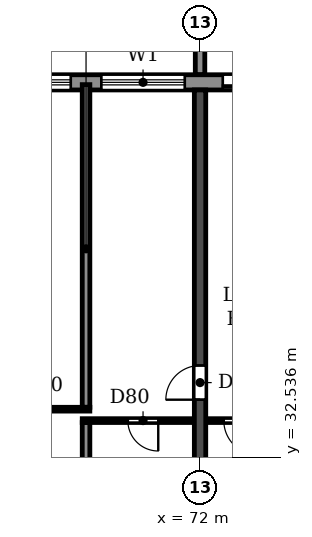
"""IFC4 building model, lengths in metres.
Left out: names, types, materials, properties, quantities, classifications, styles, units other than length and angle.
Written with IfcOpenShell. Run it as: python <this file> out.ifc"""

import sys

from ifc_helpers import new_model, si_unit, direction, frame, frame_2d, origin, place, context, subcontext, project, spatial, polyline, rectangle, outline, extrude, source, transform, mapped, element, fill, save


model = new_model("IFC4")
c1 = context("Model", 3, precision=1e-05, world=origin(), true_north=direction((0.0, 1.0)))
c2 = subcontext(c1, "Body", "Model", "MODEL_VIEW")
j1 = project(units=[si_unit("LENGTHUNIT", "METRE"), si_unit("PLANEANGLEUNIT", "RADIAN")], contexts=[c1])
p1 = place(None, origin())
s1 = spatial("IfcSite", under=j1, at=p1, CompositionType="ELEMENT")
p2 = place(p1, origin())
s2 = spatial("IfcBuilding", under=s1, at=p2, CompositionType="ELEMENT")
p3 = place(p2, frame((0.0, 0.0, 155.4)))
s3 = spatial("IfcBuildingStorey", under=s2, at=p3, CompositionType="ELEMENT", Elevation=155.4)
p4 = place(p3, frame((72.0, 30.525, 0.0), z_axis=(0.0, 0.0, 1.0), x_axis=(0.0, 1.0, 0.0)))
e1 = element("IfcWall", 1, at=p4, inside=s3, PredefinedType="SHEAR", context=c2, shape_type="SweptSolid", body=[
    extrude(rectangle(XDim=11.675, YDim=0.3, at=frame_2d((5.837, 0.0))), origin(), (0.0, 0.0, 1.0), 3.0),
])
p5 = place(p4, frame((3.525, 0.0, 0.0)))
e2 = element("IfcOpeningElement", 2, at=p5, cuts=e1, PredefinedType="OPENING", context=c2, shape_type="SweptSolid", body=[
    extrude(rectangle(XDim=0.9, YDim=2.1, at=frame_2d((0.45, 1.05))), frame((0.0, 0.16, 0.0), z_axis=(0.0, -1.0, 0.0), x_axis=(1.0, 0.0, 0.0)), (0.0, 0.0, 1.0), 0.32),
])
p6 = place(p3, frame((85.317, 42.4, 0.0), z_axis=(0.0, 0.0, 1.0), x_axis=(-1.0, 0.0, 0.0)))
e3 = element("IfcWall", 3, at=p6, inside=s3, PredefinedType="STANDARD", context=c2, shape_type="SweptSolid", body=[
    extrude(rectangle(XDim=68.634, YDim=0.4, at=frame_2d((34.317, 0.0))), origin(), (0.0, 0.0, 1.0), 3.0),
])
p7 = place(p6, frame((64.917, 0.0, 0.0)))
e4 = element("IfcOpeningElement", 4, at=p7, cuts=e3, PredefinedType="OPENING", context=c2, shape_type="SweptSolid", body=[
    extrude(rectangle(XDim=1.8, YDim=2.4, at=frame_2d((0.9, 1.2))), frame((0.0, 0.21, 0.0), z_axis=(0.0, -1.0, 0.0), x_axis=(1.0, 0.0, 0.0)), (0.0, 0.0, 1.0), 0.42),
])
p8 = place(p6, frame((61.717, 0.0, 0.9)))
e5 = element("IfcOpeningElement", 5, at=p8, cuts=e3, PredefinedType="OPENING", context=c2, shape_type="SweptSolid", body=[
    extrude(rectangle(XDim=2.2, YDim=1.5, at=frame_2d((1.1, 0.75))), frame((0.0, 0.21, 0.0), z_axis=(0.0, -1.0, 0.0), x_axis=(1.0, 0.0, 0.0)), (0.0, 0.0, 1.0), 0.42),
])
p9 = place(p6, frame((58.717, 0.0, 0.9)))
e6 = element("IfcOpeningElement", 6, at=p9, cuts=e3, PredefinedType="OPENING", context=c2, shape_type="SweptSolid", body=[
    extrude(rectangle(XDim=2.2, YDim=1.5, at=frame_2d((1.1, 0.75))), frame((0.0, 0.21, 0.0), z_axis=(0.0, -1.0, 0.0), x_axis=(1.0, 0.0, 0.0)), (0.0, 0.0, 1.0), 0.42),
])
p10 = place(p6, frame((55.917, 0.0, 0.0)))
e7 = element("IfcOpeningElement", 7, at=p10, cuts=e3, PredefinedType="OPENING", context=c2, shape_type="SweptSolid", body=[
    extrude(rectangle(XDim=1.8, YDim=2.4, at=frame_2d((0.9, 1.2))), frame((0.0, 0.21, 0.0), z_axis=(0.0, -1.0, 0.0), x_axis=(1.0, 0.0, 0.0)), (0.0, 0.0, 1.0), 0.42),
])
p11 = place(p6, frame((52.917, 0.0, 0.0)))
e8 = element("IfcOpeningElement", 8, at=p11, cuts=e3, PredefinedType="OPENING", context=c2, shape_type="SweptSolid", body=[
    extrude(rectangle(XDim=1.8, YDim=2.4, at=frame_2d((0.9, 1.2))), frame((0.0, 0.21, 0.0), z_axis=(0.0, -1.0, 0.0), x_axis=(1.0, 0.0, 0.0)), (0.0, 0.0, 1.0), 0.42),
])
p12 = place(p6, frame((49.717, 0.0, 0.9)))
e9 = element("IfcOpeningElement", 9, at=p12, cuts=e3, PredefinedType="OPENING", context=c2, shape_type="SweptSolid", body=[
    extrude(rectangle(XDim=2.2, YDim=1.5, at=frame_2d((1.1, 0.75))), frame((0.0, 0.21, 0.0), z_axis=(0.0, -1.0, 0.0), x_axis=(1.0, 0.0, 0.0)), (0.0, 0.0, 1.0), 0.42),
])
p13 = place(p6, frame((46.717, 0.0, 0.9)))
e10 = element("IfcOpeningElement", 10, at=p13, cuts=e3, PredefinedType="OPENING", context=c2, shape_type="SweptSolid", body=[
    extrude(rectangle(XDim=2.2, YDim=1.5, at=frame_2d((1.1, 0.75))), frame((0.0, 0.21, 0.0), z_axis=(0.0, -1.0, 0.0), x_axis=(1.0, 0.0, 0.0)), (0.0, 0.0, 1.0), 0.42),
])
p14 = place(p6, frame((43.717, 0.0, 0.9)))
e11 = element("IfcOpeningElement", 11, at=p14, cuts=e3, PredefinedType="OPENING", context=c2, shape_type="SweptSolid", body=[
    extrude(rectangle(XDim=2.2, YDim=1.5, at=frame_2d((1.1, 0.75))), frame((0.0, 0.21, 0.0), z_axis=(0.0, -1.0, 0.0), x_axis=(1.0, 0.0, 0.0)), (0.0, 0.0, 1.0), 0.42),
])
p15 = place(p6, frame((40.917, 0.0, 0.0)))
e12 = element("IfcOpeningElement", 12, at=p15, cuts=e3, PredefinedType="OPENING", context=c2, shape_type="SweptSolid", body=[
    extrude(rectangle(XDim=1.8, YDim=2.4, at=frame_2d((0.9, 1.2))), frame((0.0, 0.21, 0.0), z_axis=(0.0, -1.0, 0.0), x_axis=(1.0, 0.0, 0.0)), (0.0, 0.0, 1.0), 0.42),
])
p16 = place(p6, frame((37.717, 0.0, 0.9)))
e13 = element("IfcOpeningElement", 13, at=p16, cuts=e3, PredefinedType="OPENING", context=c2, shape_type="SweptSolid", body=[
    extrude(rectangle(XDim=2.2, YDim=1.5, at=frame_2d((1.1, 0.75))), frame((0.0, 0.21, 0.0), z_axis=(0.0, -1.0, 0.0), x_axis=(1.0, 0.0, 0.0)), (0.0, 0.0, 1.0), 0.42),
])
p17 = place(p6, frame((34.917, 0.0, 0.0)))
e14 = element("IfcOpeningElement", 14, at=p17, cuts=e3, PredefinedType="OPENING", context=c2, shape_type="SweptSolid", body=[
    extrude(rectangle(XDim=1.8, YDim=2.4, at=frame_2d((0.9, 1.2))), frame((0.0, 0.21, 0.0), z_axis=(0.0, -1.0, 0.0), x_axis=(1.0, 0.0, 0.0)), (0.0, 0.0, 1.0), 0.42),
])
p18 = place(p6, frame((31.717, 0.0, 0.9)))
e15 = element("IfcOpeningElement", 15, at=p18, cuts=e3, PredefinedType="OPENING", context=c2, shape_type="SweptSolid", body=[
    extrude(rectangle(XDim=2.2, YDim=1.5, at=frame_2d((1.1, 0.75))), frame((0.0, 0.21, 0.0), z_axis=(0.0, -1.0, 0.0), x_axis=(1.0, 0.0, 0.0)), (0.0, 0.0, 1.0), 0.42),
])
p19 = place(p6, frame((28.717, 0.0, 0.9)))
e16 = element("IfcOpeningElement", 16, at=p19, cuts=e3, PredefinedType="OPENING", context=c2, shape_type="SweptSolid", body=[
    extrude(rectangle(XDim=2.2, YDim=1.5, at=frame_2d((1.1, 0.75))), frame((0.0, 0.21, 0.0), z_axis=(0.0, -1.0, 0.0), x_axis=(1.0, 0.0, 0.0)), (0.0, 0.0, 1.0), 0.42),
])
p20 = place(p6, frame((25.717, 0.0, 0.9)))
e17 = element("IfcOpeningElement", 17, at=p20, cuts=e3, PredefinedType="OPENING", context=c2, shape_type="SweptSolid", body=[
    extrude(rectangle(XDim=2.2, YDim=1.5, at=frame_2d((1.1, 0.75))), frame((0.0, 0.21, 0.0), z_axis=(0.0, -1.0, 0.0), x_axis=(1.0, 0.0, 0.0)), (0.0, 0.0, 1.0), 0.42),
])
p21 = place(p6, frame((22.717, 0.0, 0.9)))
e18 = element("IfcOpeningElement", 18, at=p21, cuts=e3, PredefinedType="OPENING", context=c2, shape_type="SweptSolid", body=[
    extrude(rectangle(XDim=2.2, YDim=1.5, at=frame_2d((1.1, 0.75))), frame((0.0, 0.21, 0.0), z_axis=(0.0, -1.0, 0.0), x_axis=(1.0, 0.0, 0.0)), (0.0, 0.0, 1.0), 0.42),
])
p22 = place(p6, frame((19.917, 0.0, 0.0)))
e19 = element("IfcOpeningElement", 19, at=p22, cuts=e3, PredefinedType="OPENING", context=c2, shape_type="SweptSolid", body=[
    extrude(rectangle(XDim=1.8, YDim=2.4, at=frame_2d((0.9, 1.2))), frame((0.0, 0.21, 0.0), z_axis=(0.0, -1.0, 0.0), x_axis=(1.0, 0.0, 0.0)), (0.0, 0.0, 1.0), 0.42),
])
p23 = place(p6, frame((16.717, 0.0, 0.9)))
e20 = element("IfcOpeningElement", 20, at=p23, cuts=e3, PredefinedType="OPENING", context=c2, shape_type="SweptSolid", body=[
    extrude(rectangle(XDim=2.2, YDim=1.5, at=frame_2d((1.1, 0.75))), frame((0.0, 0.21, 0.0), z_axis=(0.0, -1.0, 0.0), x_axis=(1.0, 0.0, 0.0)), (0.0, 0.0, 1.0), 0.42),
])
p24 = place(p6, frame((13.717, 0.0, 0.9)))
e21 = element("IfcOpeningElement", 21, at=p24, cuts=e3, PredefinedType="OPENING", context=c2, shape_type="SweptSolid", body=[
    extrude(rectangle(XDim=2.2, YDim=1.5, at=frame_2d((1.1, 0.75))), frame((0.0, 0.21, 0.0), z_axis=(0.0, -1.0, 0.0), x_axis=(1.0, 0.0, 0.0)), (0.0, 0.0, 1.0), 0.42),
])
p25 = place(p6, frame((10.917, 0.0, 0.0)))
e22 = element("IfcOpeningElement", 22, at=p25, cuts=e3, PredefinedType="OPENING", context=c2, shape_type="SweptSolid", body=[
    extrude(rectangle(XDim=1.8, YDim=2.4, at=frame_2d((0.9, 1.2))), frame((0.0, 0.21, 0.0), z_axis=(0.0, -1.0, 0.0), x_axis=(1.0, 0.0, 0.0)), (0.0, 0.0, 1.0), 0.42),
])
p26 = place(p6, frame((7.717, 0.0, 0.9)))
e23 = element("IfcOpeningElement", 23, at=p26, cuts=e3, PredefinedType="OPENING", context=c2, shape_type="SweptSolid", body=[
    extrude(rectangle(XDim=2.2, YDim=1.5, at=frame_2d((1.1, 0.75))), frame((0.0, 0.21, 0.0), z_axis=(0.0, -1.0, 0.0), x_axis=(1.0, 0.0, 0.0)), (0.0, 0.0, 1.0), 0.42),
])
p27 = place(p6, frame((4.717, 0.0, 0.9)))
e24 = element("IfcOpeningElement", 24, at=p27, cuts=e3, PredefinedType="OPENING", context=c2, shape_type="SweptSolid", body=[
    extrude(rectangle(XDim=2.2, YDim=1.5, at=frame_2d((1.1, 0.75))), frame((0.0, 0.21, 0.0), z_axis=(0.0, -1.0, 0.0), x_axis=(1.0, 0.0, 0.0)), (0.0, 0.0, 1.0), 0.42),
])
p28 = place(p6, frame((1.917, 0.0, 0.0)))
e25 = element("IfcOpeningElement", 25, at=p28, cuts=e3, PredefinedType="OPENING", context=c2, shape_type="SweptSolid", body=[
    extrude(rectangle(XDim=1.8, YDim=2.4, at=frame_2d((0.9, 1.2))), frame((0.0, 0.21, 0.0), z_axis=(0.0, -1.0, 0.0), x_axis=(1.0, 0.0, 0.0)), (0.0, 0.0, 1.0), 0.42),
])
m1 = source(origin(), c2, "Body", "SweptSolid", [
    extrude(outline(polyline([(0.0, 0.0), (0.25, 0.0), (0.25, 3.1), (0.0, 3.1), (0.0, 0.0)])), origin(), (0.0, 0.0, 1.0), 3.1),
])
p29 = place(p3, frame((71.875, 42.6, 0.0)))
e26 = element("IfcWall", 26, at=p29, inside=s3, PredefinedType="STANDARD", context=c2, shape_type="MappedRepresentation", body=[
    mapped(m1, transform((0.0, 0.0, 0.0))),
])
p30 = place(p3, frame((69.0, 30.535, 0.0), z_axis=(0.0, 0.0, 1.0), x_axis=(0.0, 1.0, 0.0)))
e27 = element("IfcWall", 27, at=p30, inside=s3, PredefinedType="PARTITIONING", context=c2, shape_type="SweptSolid", body=[
    extrude(rectangle(XDim=2.915, YDim=0.2, at=frame_2d((1.458, 0.0))), origin(), (0.0, 0.0, 1.0), 3.0),
])
p31 = place(p3, frame((69.0, 33.85, 0.0), z_axis=(0.0, 0.0, 1.0), x_axis=(0.0, 1.0, 0.0)))
e28 = element("IfcWall", 28, at=p31, inside=s3, PredefinedType="PARTITIONING", context=c2, shape_type="SweptSolid", body=[
    extrude(rectangle(XDim=8.49, YDim=0.2, at=frame_2d((4.245, 0.0))), origin(), (0.0, 0.0, 1.0), 3.0),
])
p32 = place(p3, frame((68.9, 33.5, 0.0), z_axis=(0.0, 0.0, 1.0), x_axis=(1.0, 0.0, 0.0)))
e29 = element("IfcWall", 29, at=p32, inside=s3, PredefinedType="PARTITIONING", context=c2, shape_type="SweptSolid", body=[
    extrude(rectangle(XDim=2.94, YDim=0.1, at=frame_2d((1.47, 0.0))), origin(), (0.0, 0.0, 1.0), 3.0),
])
p33 = place(p32, frame((1.2, 0.0, 0.0)))
e30 = element("IfcOpeningElement", 30, at=p33, cuts=e29, PredefinedType="OPENING", context=c2, shape_type="SweptSolid", body=[
    extrude(rectangle(XDim=0.8, YDim=2.1, at=frame_2d((0.4, 1.05))), frame((0.0, 0.06, 0.0), z_axis=(0.0, -1.0, 0.0), x_axis=(1.0, 0.0, 0.0)), (0.0, 0.0, 1.0), 0.12),
])
p34 = place(p3, frame((72.16, 33.5, 0.0), z_axis=(0.0, 0.0, 1.0), x_axis=(1.0, 0.0, 0.0)))
e31 = element("IfcWall", 31, at=p34, inside=s3, PredefinedType="PARTITIONING", context=c2, shape_type="SweptSolid", body=[
    extrude(rectangle(XDim=2.04, YDim=0.1, at=frame_2d((1.02, 0.0))), origin(), (0.0, 0.0, 1.0), 3.0),
])
p35 = place(p34, frame((0.465, 0.0, 0.0)))
e32 = element("IfcOpeningElement", 32, at=p35, cuts=e31, PredefinedType="OPENING", context=c2, shape_type="SweptSolid", body=[
    extrude(rectangle(XDim=0.9, YDim=2.1, at=frame_2d((0.45, 1.05))), frame((0.0, 0.06, 0.0), z_axis=(0.0, -1.0, 0.0), x_axis=(1.0, 0.0, 0.0)), (0.0, 0.0, 1.0), 0.12),
])
p36 = place(p3, frame((66.16, 33.8, 0.0), z_axis=(0.0, 0.0, 1.0), x_axis=(1.0, 0.0, 0.0)))
e33 = element("IfcWall", 33, at=p36, inside=s3, PredefinedType="PARTITIONING", context=c2, shape_type="SweptSolid", body=[
    extrude(rectangle(XDim=2.94, YDim=0.1, at=frame_2d((1.47, 0.0))), origin(), (0.0, 0.0, 1.0), 3.0),
])
p37 = place(p36, frame((0.94, 0.0, 0.0)))
e34 = element("IfcOpeningElement", 34, at=p37, cuts=e33, PredefinedType="OPENING", context=c2, shape_type="SweptSolid", body=[
    extrude(rectangle(XDim=0.8, YDim=2.1, at=frame_2d((0.4, 1.05))), frame((0.0, 0.06, 0.0), z_axis=(0.0, -1.0, 0.0), x_axis=(1.0, 0.0, 0.0)), (0.0, 0.0, 1.0), 0.12),
])
p38 = place(p23, origin())
e35 = element("IfcWindow", 35, at=p38, inside=s3, PartitioningType="DOUBLE_PANEL_HORIZONTAL", PredefinedType="WINDOW", context=c2, shape_type="SweptSolid", body=[
    extrude(rectangle(XDim=2.2, YDim=1.5, at=frame_2d((1.1, 0.75))), frame((0.0, 0.03, 0.0), z_axis=(0.0, -1.0, 0.0), x_axis=(1.0, 0.0, 0.0)), (0.0, 0.0, 1.0), 0.06),
])
fill(e20, e35)
p39 = place(p24, origin())
e36 = element("IfcWindow", 36, at=p39, inside=s3, PartitioningType="DOUBLE_PANEL_HORIZONTAL", PredefinedType="WINDOW", context=c2, shape_type="SweptSolid", body=[
    extrude(rectangle(XDim=2.2, YDim=1.5, at=frame_2d((1.1, 0.75))), frame((0.0, 0.03, 0.0), z_axis=(0.0, -1.0, 0.0), x_axis=(1.0, 0.0, 0.0)), (0.0, 0.0, 1.0), 0.06),
])
fill(e21, e36)
p40 = place(p25, origin())
e37 = element("IfcDoor", 37, at=p40, inside=s3, OperationType="DOUBLE_DOOR_SLIDING", PredefinedType="DOOR", context=c2, shape_type="SweptSolid", body=[
    extrude(rectangle(XDim=1.8, YDim=2.4, at=frame_2d((0.9, 1.2))), frame((0.0, 0.025, 0.0), z_axis=(0.0, -1.0, 0.0), x_axis=(1.0, 0.0, 0.0)), (0.0, 0.0, 1.0), 0.05),
])
fill(e22, e37)
p41 = place(p33, frame((0.8, 0.0, 0.0), z_axis=(0.0, 0.0, 1.0), x_axis=(-1.0, 0.0, 0.0)))
e38 = element("IfcDoor", 38, at=p41, inside=s3, OperationType="SINGLE_SWING_LEFT", PredefinedType="DOOR", context=c2, shape_type="SweptSolid", body=[
    extrude(rectangle(XDim=0.8, YDim=2.1, at=frame_2d((0.4, 1.05))), frame((0.0, 0.025, 0.0), z_axis=(0.0, -1.0, 0.0), x_axis=(1.0, 0.0, 0.0)), (0.0, 0.0, 1.0), 0.05),
])
fill(e30, e38)
p42 = place(p5, origin())
e39 = element("IfcDoor", 39, at=p42, inside=s3, OperationType="SINGLE_SWING_LEFT", PredefinedType="DOOR", context=c2, shape_type="SweptSolid", body=[
    extrude(rectangle(XDim=0.9, YDim=2.1, at=frame_2d((0.45, 1.05))), frame((0.0, 0.025, 0.0), z_axis=(0.0, -1.0, 0.0), x_axis=(1.0, 0.0, 0.0)), (0.0, 0.0, 1.0), 0.05),
])
fill(e2, e39)
p43 = place(p35, frame((0.9, 0.0, 0.0), z_axis=(0.0, 0.0, 1.0), x_axis=(-1.0, 0.0, 0.0)))
e40 = element("IfcDoor", 40, at=p43, inside=s3, OperationType="SINGLE_SWING_LEFT", PredefinedType="DOOR", context=c2, shape_type="SweptSolid", body=[
    extrude(rectangle(XDim=0.9, YDim=2.1, at=frame_2d((0.45, 1.05))), frame((0.0, 0.025, 0.0), z_axis=(0.0, -1.0, 0.0), x_axis=(1.0, 0.0, 0.0)), (0.0, 0.0, 1.0), 0.05),
])
fill(e32, e40)
save(model, sys.argv[1])
